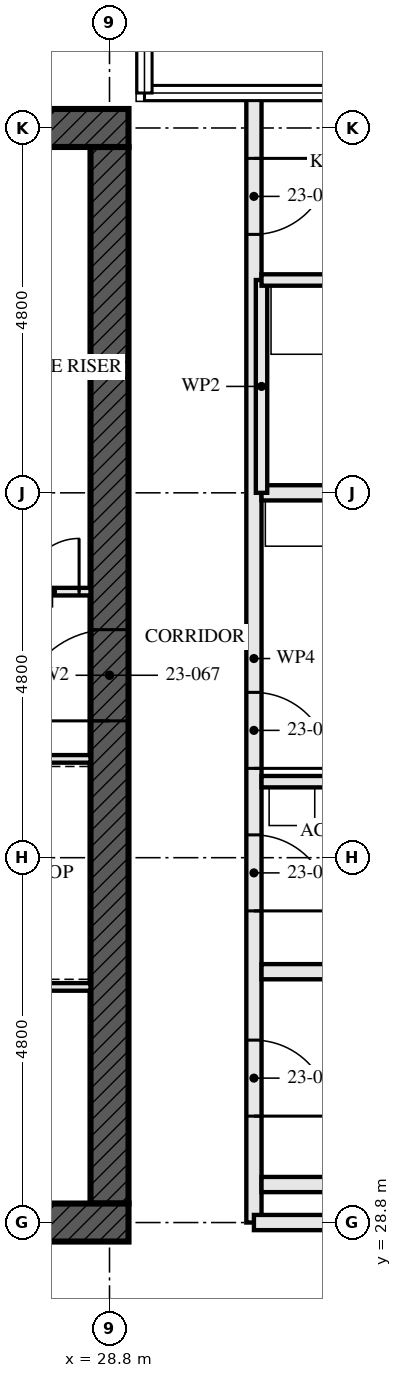
"""IFC4 building model, lengths in metres.
Left out: names, types, materials, properties, quantities, classifications, styles, units other than length and angle.
Written with IfcOpenShell. Run it as: python <this file> out.ifc"""

import sys

from ifc_helpers import new_model, si_unit, direction, frame, frame_2d, origin, place, context, subcontext, project, spatial, rectangle, extrude, element, fill, save


model = new_model("IFC4")
c1 = context("Model", 3, precision=1e-05, world=origin(), true_north=direction((0.0, 1.0)))
c2 = subcontext(c1, "Body", "Model", "MODEL_VIEW")
j1 = project(units=[si_unit("LENGTHUNIT", "METRE"), si_unit("PLANEANGLEUNIT", "RADIAN")], contexts=[c1])
p1 = place(None, origin())
s1 = spatial("IfcSite", under=j1, at=p1, CompositionType="ELEMENT")
p2 = place(p1, origin())
s2 = spatial("IfcBuilding", under=s1, at=p2, CompositionType="ELEMENT")
p3 = place(p2, frame((0.0, 0.0, 87.5)))
s3 = spatial("IfcBuildingStorey", under=s2, at=p3, CompositionType="ELEMENT", Elevation=87.5)
p4 = place(p3, frame((14.15, 28.8, -0.17), z_axis=(0.0, 0.0, 1.0), x_axis=(1.0, 0.0, 0.0)))
e1 = element("IfcWall", 1, at=p4, inside=s3, PredefinedType="SHEAR", context=c2, shape_type="SweptSolid", body=[
    extrude(rectangle(XDim=14.9, YDim=0.5, at=frame_2d((7.45, 0.0))), origin(), (0.0, 0.0, 1.0), 3.5),
])
p5 = place(p4, frame((6.85, 0.0, 0.17)))
e2 = element("IfcOpeningElement", 2, at=p5, cuts=e1, PredefinedType="OPENING", context=c2, shape_type="SweptSolid", body=[
    extrude(rectangle(XDim=1.2, YDim=2.1, at=frame_2d((0.6, 1.05))), frame((0.0, 0.26, 0.0), z_axis=(0.0, -1.0, 0.0), x_axis=(1.0, 0.0, 0.0)), (0.0, 0.0, 1.0), 0.521),
])
p6 = place(p3, frame((29.05, 43.2, -0.17), z_axis=(0.0, 0.0, 1.0), x_axis=(-1.0, 0.0, 0.0)))
e3 = element("IfcWall", 3, at=p6, inside=s3, PredefinedType="SHEAR", context=c2, shape_type="SweptSolid", body=[
    extrude(rectangle(XDim=14.9, YDim=0.5, at=frame_2d((7.45, 0.0))), origin(), (0.0, 0.0, 1.0), 3.5),
])
p7 = place(p6, frame((6.85, 0.0, 0.17)))
e4 = element("IfcOpeningElement", 4, at=p7, cuts=e3, PredefinedType="OPENING", context=c2, shape_type="SweptSolid", body=[
    extrude(rectangle(XDim=1.2, YDim=2.1, at=frame_2d((0.6, 1.05))), frame((0.0, 0.26, 0.0), z_axis=(0.0, -1.0, 0.0), x_axis=(1.0, 0.0, 0.0)), (0.0, 0.0, 1.0), 0.521),
])
p8 = place(p3, frame((28.8, 29.05, -0.17), z_axis=(0.0, 0.0, 1.0), x_axis=(0.0, 1.0, 0.0)))
e5 = element("IfcWall", 5, at=p8, inside=s3, PredefinedType="SHEAR", context=c2, shape_type="SweptSolid", body=[
    extrude(rectangle(XDim=13.9, YDim=0.5, at=frame_2d((6.95, 0.0))), origin(), (0.0, 0.0, 1.0), 3.5),
])
p9 = place(p8, frame((6.35, 0.0, 0.17)))
e6 = element("IfcOpeningElement", 6, at=p9, cuts=e5, PredefinedType="OPENING", context=c2, shape_type="SweptSolid", body=[
    extrude(rectangle(XDim=1.2, YDim=2.1, at=frame_2d((0.6, 1.05))), frame((0.0, 0.26, 0.0), z_axis=(0.0, -1.0, 0.0), x_axis=(1.0, 0.0, 0.0)), (0.0, 0.0, 1.0), 0.521),
])
for number, where, z_axis, x_axis in (
    (7, (35.5, 29.3, 0.0), (0.0, 0.0, 1.0), (-1.0, 0.0, 0.0)),
    (8, (35.5, 32.1, 0.0), (0.0, 0.0, 1.0), (-1.0, 0.0, 0.0)),
):
    element("IfcWall", number, at=place(p3, frame(where, z_axis=z_axis, x_axis=x_axis)), inside=s3, PredefinedType="SOLIDWALL", context=c2, shape_type="SweptSolid", body=[
        extrude(rectangle(XDim=4.7, YDim=0.2, at=frame_2d((2.35, 0.0))), origin(), (0.0, 0.0, 1.0), 2.99),
    ])
p10 = place(p3, frame((33.8, 34.6, 0.0), z_axis=(0.0, 0.0, 1.0), x_axis=(-1.0, 0.0, 0.0)))
e9 = element("IfcWall", 9, at=p10, inside=s3, PredefinedType="PARTITIONING", context=c2, shape_type="SweptSolid", body=[
    extrude(rectangle(XDim=3.0, YDim=0.15, at=frame_2d((1.5, 0.0))), origin(), (0.0, 0.0, 1.0), 3.33),
])
p11 = place(p3, frame((38.055, 38.4, 0.0), z_axis=(0.0, 0.0, 1.0), x_axis=(-1.0, 0.0, 0.0)))
e10 = element("IfcWall", 10, at=p11, inside=s3, PredefinedType="PARTITIONING", context=c2, shape_type="SweptSolid", body=[
    extrude(rectangle(XDim=7.255, YDim=0.2, at=frame_2d((3.627, 0.0))), origin(), (0.0, 0.0, 1.0), 2.55),
])
p12 = place(p3, frame((33.8, 41.2, 0.0), z_axis=(0.0, 0.0, 1.0), x_axis=(-1.0, 0.0, 0.0)))
e11 = element("IfcWall", 11, at=p12, inside=s3, PredefinedType="PARTITIONING", context=c2, shape_type="SweptSolid", body=[
    extrude(rectangle(XDim=3.0, YDim=0.15, at=frame_2d((1.5, 0.0))), origin(), (0.0, 0.0, 1.0), 3.33),
])
p13 = place(p3, frame((30.8, 38.4, 0.0), z_axis=(0.0, 0.0, 1.0), x_axis=(0.0, 1.0, 0.0)))
e12 = element("IfcWall", 12, at=p13, inside=s3, PredefinedType="PARTITIONING", context=c2, shape_type="SweptSolid", body=[
    extrude(rectangle(XDim=2.8, YDim=0.15, at=frame_2d((1.4, 0.0))), origin(), (0.0, 0.0, 1.0), 3.33),
])
p14 = place(p3, frame((30.7, 28.8, 0.0), z_axis=(0.0, 0.0, 1.0), x_axis=(0.0, 1.0, 0.0)))
e13 = element("IfcWall", 13, at=p14, inside=s3, PredefinedType="PARTITIONING", context=c2, shape_type="SweptSolid", body=[
    extrude(rectangle(XDim=14.84, YDim=0.2, at=frame_2d((7.42, 0.0))), origin(), (0.0, 0.0, 1.0), 2.32),
])
p15 = place(p14, frame((1.4, 0.0, 0.0)))
e14 = element("IfcOpeningElement", 14, at=p15, cuts=e13, PredefinedType="OPENING", context=c2, shape_type="SweptSolid", body=[
    extrude(rectangle(XDim=1.0, YDim=2.1, at=frame_2d((0.5, 1.05))), frame((0.0, 0.111, 0.0), z_axis=(0.0, -1.0, 0.0), x_axis=(1.0, 0.0, 0.0)), (0.0, 0.0, 1.0), 0.221),
])
p16 = place(p14, frame((4.1, 0.0, 0.0)))
e15 = element("IfcOpeningElement", 15, at=p16, cuts=e13, PredefinedType="OPENING", context=c2, shape_type="SweptSolid", body=[
    extrude(rectangle(XDim=1.0, YDim=2.1, at=frame_2d((0.5, 1.05))), frame((0.0, 0.111, 0.0), z_axis=(0.0, -1.0, 0.0), x_axis=(1.0, 0.0, 0.0)), (0.0, 0.0, 1.0), 0.221),
])
p17 = place(p14, frame((5.975, 0.0, 0.0)))
e16 = element("IfcOpeningElement", 16, at=p17, cuts=e13, PredefinedType="OPENING", context=c2, shape_type="SweptSolid", body=[
    extrude(rectangle(XDim=1.0, YDim=2.1, at=frame_2d((0.5, 1.05))), frame((0.0, 0.111, 0.0), z_axis=(0.0, -1.0, 0.0), x_axis=(1.0, 0.0, 0.0)), (0.0, 0.0, 1.0), 0.221),
])
p18 = place(p14, frame((13.0, 0.0, 0.0)))
e17 = element("IfcOpeningElement", 17, at=p18, cuts=e13, PredefinedType="OPENING", context=c2, shape_type="SweptSolid", body=[
    extrude(rectangle(XDim=1.0, YDim=2.1, at=frame_2d((0.5, 1.05))), frame((0.0, 0.111, 0.0), z_axis=(0.0, -1.0, 0.0), x_axis=(1.0, 0.0, 0.0)), (0.0, 0.0, 1.0), 0.221),
])
p19 = place(p3, frame((23.05, 34.9, 0.0), z_axis=(0.0, 0.0, 1.0), x_axis=(1.0, 0.0, 0.0)))
e18 = element("IfcWall", 18, at=p19, inside=s3, PredefinedType="SOLIDWALL", context=c2, shape_type="SweptSolid", body=[
    extrude(rectangle(XDim=5.5, YDim=0.1, at=frame_2d((2.75, 0.0))), origin(), (0.0, 0.0, 1.0), 3.33),
])
p20 = place(p3, frame((22.65, 37.1, 0.0), z_axis=(0.0, 0.0, 1.0), x_axis=(1.0, 0.0, 0.0)))
e19 = element("IfcWall", 19, at=p20, inside=s3, PredefinedType="SOLIDWALL", context=c2, shape_type="SweptSolid", body=[
    extrude(rectangle(XDim=5.9, YDim=0.1, at=frame_2d((2.95, 0.0))), origin(), (0.0, 0.0, 1.0), 3.33),
])
p21 = place(p20, frame((3.5, 0.0, 0.0)))
e20 = element("IfcOpeningElement", 20, at=p21, cuts=e19, PredefinedType="OPENING", context=c2, shape_type="SweptSolid", body=[
    extrude(rectangle(XDim=0.9, YDim=2.1, at=frame_2d((0.45, 1.05))), frame((0.0, 0.061, 0.0), z_axis=(0.0, -1.0, 0.0), x_axis=(1.0, 0.0, 0.0)), (0.0, 0.0, 1.0), 0.121),
])
p22 = place(p20, frame((5.05, 0.0, 0.0)))
e21 = element("IfcOpeningElement", 21, at=p22, cuts=e19, PredefinedType="OPENING", context=c2, shape_type="SweptSolid", body=[
    extrude(rectangle(XDim=0.7, YDim=2.1, at=frame_2d((0.35, 1.05))), frame((0.0, 0.061, 0.0), z_axis=(0.0, -1.0, 0.0), x_axis=(1.0, 0.0, 0.0)), (0.0, 0.0, 1.0), 0.121),
])
p23 = place(p3, frame((23.15, 31.9, 0.0), z_axis=(0.0, 0.0, 1.0), x_axis=(1.0, 0.0, 0.0)))
e22 = element("IfcWall", 22, at=p23, inside=s3, PredefinedType="SOLIDWALL", context=c2, shape_type="SweptSolid", body=[
    extrude(rectangle(XDim=5.4, YDim=0.1, at=frame_2d((2.7, 0.0))), origin(), (0.0, 0.0, 1.0), 3.33),
])
p24 = place(p3, frame((33.23, 28.8, 0.0), z_axis=(0.0, 0.0, 1.0), x_axis=(-1.0, 0.0, 0.0)))
e23 = element("IfcWall", 23, at=p24, inside=s3, PredefinedType="PARTITIONING", context=c2, shape_type="SweptSolid", body=[
    extrude(rectangle(XDim=2.53, YDim=0.2, at=frame_2d((1.265, 0.0))), origin(), (0.0, 0.0, 1.0), 2.32),
])
p25 = place(p15, frame((1.0, 0.0, 0.0), z_axis=(0.0, 0.0, 1.0), x_axis=(-1.0, 0.0, 0.0)))
e24 = element("IfcDoor", 24, at=p25, inside=s3, OperationType="SINGLE_SWING_LEFT", PredefinedType="DOOR", context=c2, shape_type="SweptSolid", body=[
    extrude(rectangle(XDim=1.0, YDim=2.1, at=frame_2d((0.5, 1.05))), frame((0.0, 0.032, 0.0), z_axis=(0.0, -1.0, 0.0), x_axis=(1.0, 0.0, 0.0)), (0.0, 0.0, 1.0), 0.064),
])
fill(e14, e24)
p26 = place(p16, frame((1.0, 0.0, 0.0), z_axis=(0.0, 0.0, 1.0), x_axis=(-1.0, 0.0, 0.0)))
e25 = element("IfcDoor", 25, at=p26, inside=s3, OperationType="SINGLE_SWING_LEFT", PredefinedType="DOOR", context=c2, shape_type="SweptSolid", body=[
    extrude(rectangle(XDim=1.0, YDim=2.1, at=frame_2d((0.5, 1.05))), frame((0.0, 0.027, 0.0), z_axis=(0.0, -1.0, 0.0), x_axis=(1.0, 0.0, 0.0)), (0.0, 0.0, 1.0), 0.054),
])
fill(e15, e25)
p27 = place(p17, frame((1.0, 0.0, 0.0), z_axis=(0.0, 0.0, 1.0), x_axis=(-1.0, 0.0, 0.0)))
e26 = element("IfcDoor", 26, at=p27, inside=s3, OperationType="SINGLE_SWING_LEFT", PredefinedType="DOOR", context=c2, shape_type="SweptSolid", body=[
    extrude(rectangle(XDim=1.0, YDim=2.1, at=frame_2d((0.5, 1.05))), frame((0.0, 0.027, 0.0), z_axis=(0.0, -1.0, 0.0), x_axis=(1.0, 0.0, 0.0)), (0.0, 0.0, 1.0), 0.054),
])
fill(e16, e26)
p28 = place(p18, frame((1.0, 0.0, 0.0), z_axis=(0.0, 0.0, 1.0), x_axis=(-1.0, 0.0, 0.0)))
e27 = element("IfcDoor", 27, at=p28, inside=s3, OperationType="SINGLE_SWING_RIGHT", PredefinedType="DOOR", context=c2, shape_type="SweptSolid", body=[
    extrude(rectangle(XDim=1.0, YDim=2.1, at=frame_2d((0.5, 1.05))), frame((0.0, 0.027, 0.0), z_axis=(0.0, -1.0, 0.0), x_axis=(1.0, 0.0, 0.0)), (0.0, 0.0, 1.0), 0.054),
])
fill(e17, e27)
p29 = place(p22, origin())
e28 = element("IfcDoor", 28, at=p29, inside=s3, OperationType="SINGLE_SWING_LEFT", PredefinedType="DOOR", context=c2, shape_type="SweptSolid", body=[
    extrude(rectangle(XDim=0.7, YDim=2.1, at=frame_2d((0.35, 1.05))), frame((0.0, 0.027, 0.0), z_axis=(0.0, -1.0, 0.0), x_axis=(1.0, 0.0, 0.0)), (0.0, 0.0, 1.0), 0.054),
])
fill(e21, e28)
p30 = place(p9, origin())
e29 = element("IfcDoor", 29, at=p30, inside=s3, OperationType="SINGLE_SWING_LEFT", PredefinedType="DOOR", context=c2, shape_type="SweptSolid", body=[
    extrude(rectangle(XDim=1.2, YDim=2.1, at=frame_2d((0.6, 1.05))), frame((0.0, 0.027, 0.0), z_axis=(0.0, -1.0, 0.0), x_axis=(1.0, 0.0, 0.0)), (0.0, 0.0, 1.0), 0.054),
])
fill(e6, e29)
save(model, sys.argv[1])
